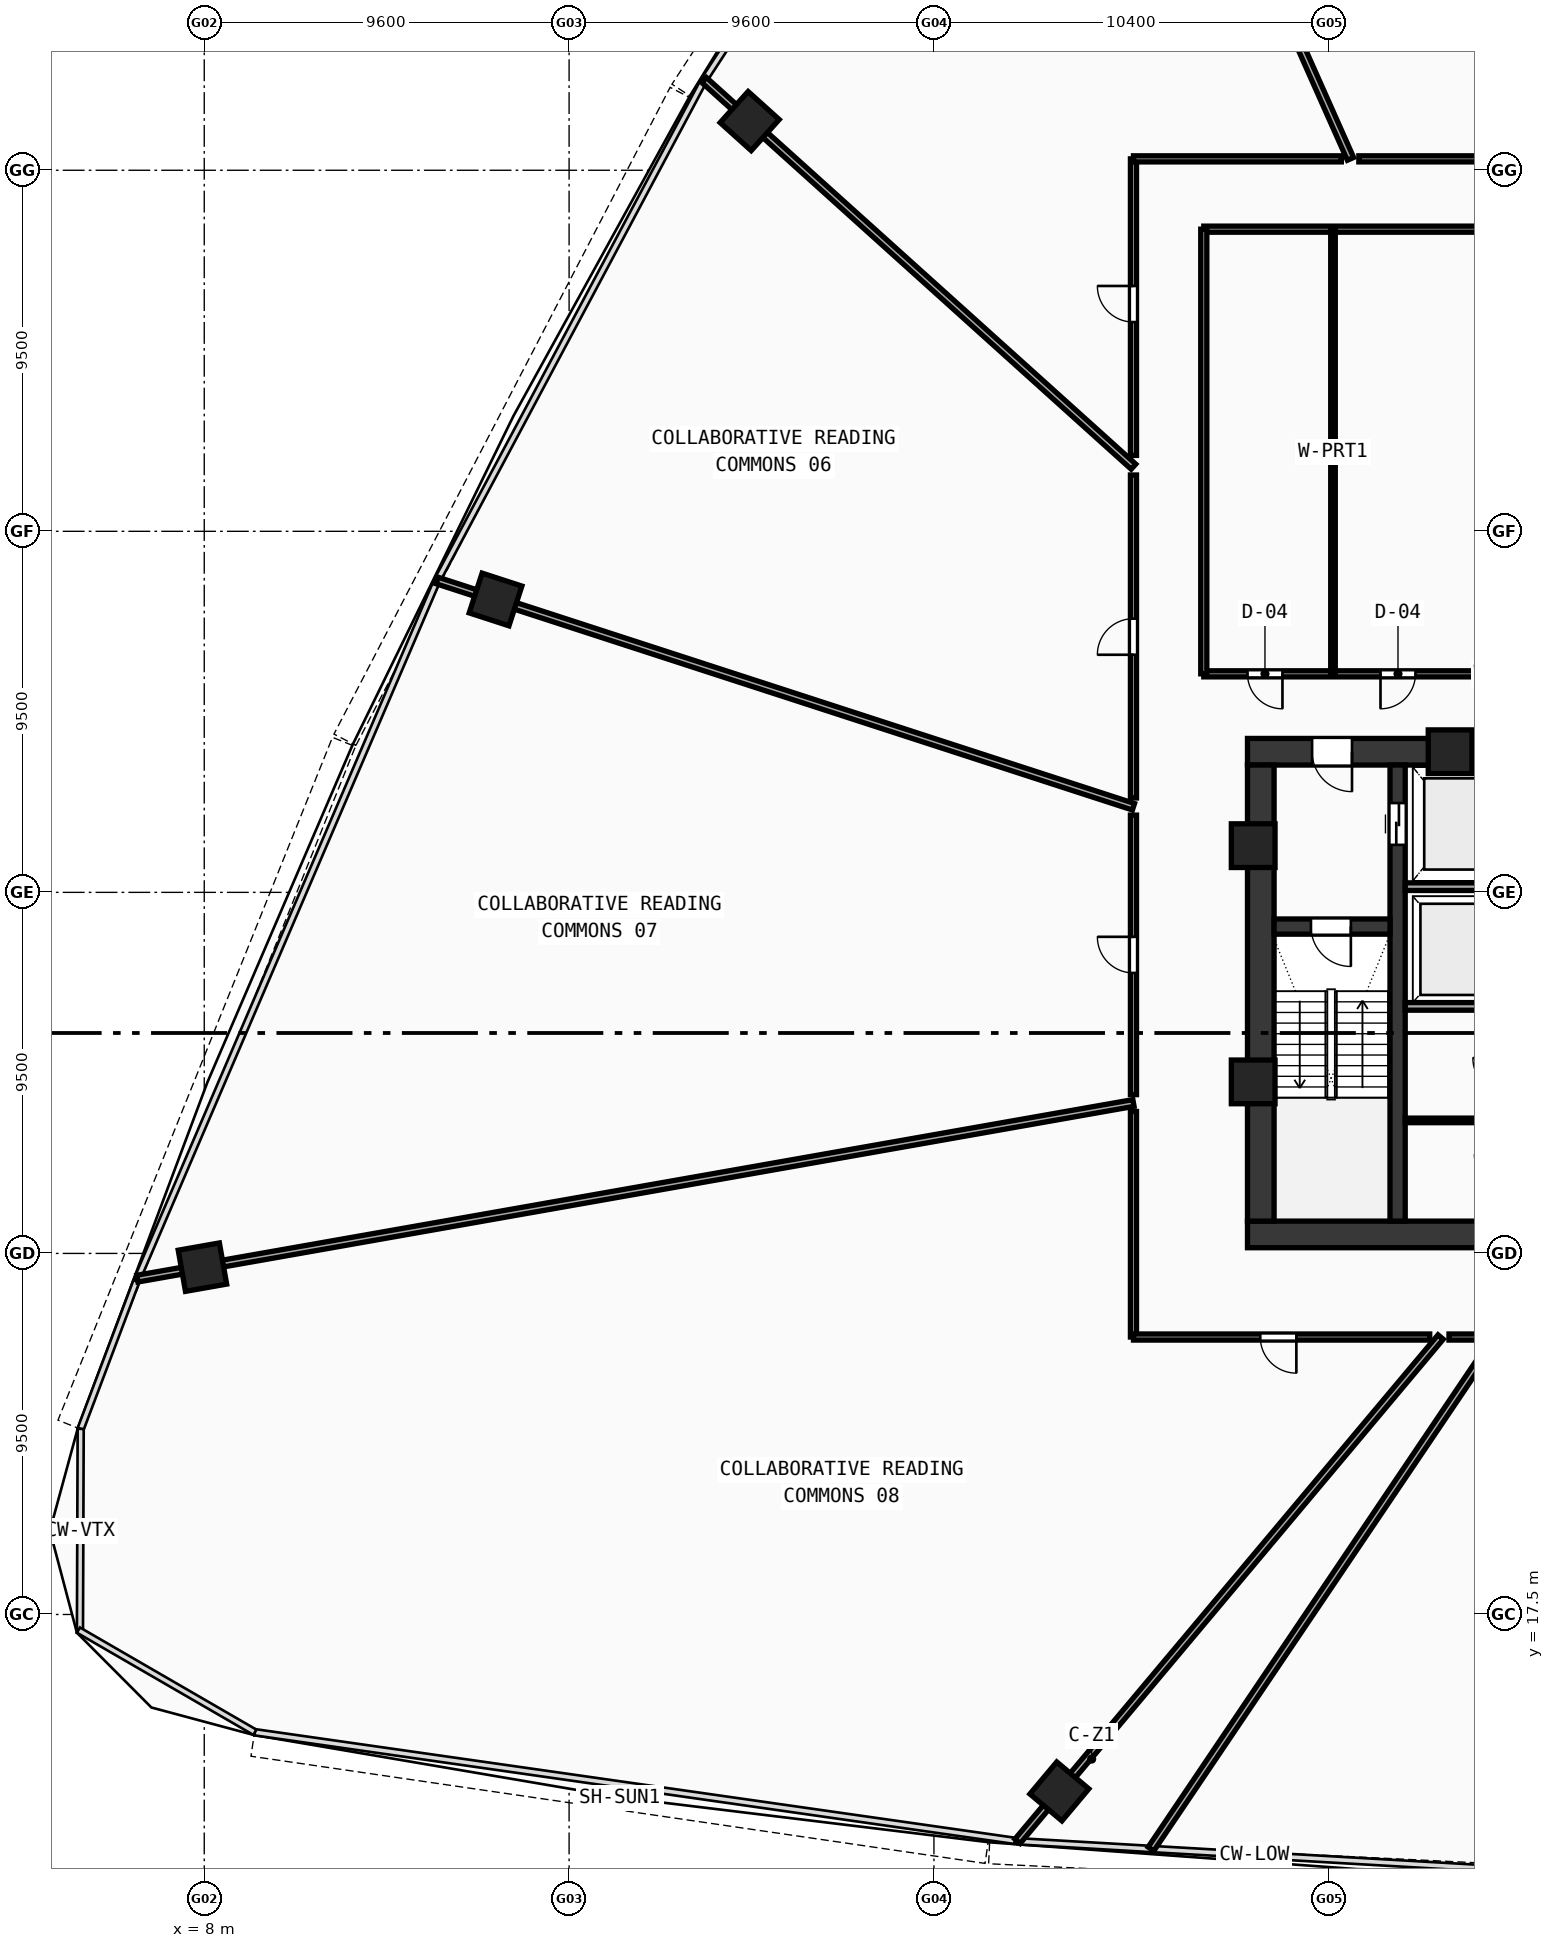
"""IFC4 building model, lengths in metres.
Left out: names, types, materials, properties, quantities, classifications, styles, units other than length and angle.
Written with IfcOpenShell. Run it as: python <this file> out.ifc"""

import sys

from ifc_helpers import new_model, si_unit, direction, frame, frame_2d, origin, origin_with_axes, origin_2d, place, context, subcontext, project, spatial, rectangle, hollow_rectangle, extrude, source, transform, mapped, element, fill, save


model = new_model("IFC4")
c1 = context("Model", 3, precision=1e-05, world=origin(), true_north=direction((0.0, 1.0)))
c2 = subcontext(c1, "Body", "Model", "MODEL_VIEW")
j1 = project(units=[si_unit("LENGTHUNIT", "METRE"), si_unit("PLANEANGLEUNIT", "RADIAN")], contexts=[c1])
p1 = place(None, origin())
s1 = spatial("IfcSite", under=j1, at=p1, CompositionType="ELEMENT")
p2 = place(p1, origin())
s2 = spatial("IfcBuilding", under=s1, at=p2, CompositionType="ELEMENT")
p3 = place(p2, frame((0.0, 0.0, 48.55)))
s3 = spatial("IfcBuildingStorey", under=s2, at=p3, CompositionType="ELEMENT", Elevation=48.55)
p4 = place(p3, frame((35.45, 27.5, 0.0), z_axis=(0.0, 0.0, 1.0), x_axis=(1.0, 0.0, 0.0)))
e1 = element("IfcWall", 1, at=p4, inside=s3, PredefinedType="SHEAR", context=c2, shape_type="SweptSolid", body=[
    extrude(rectangle(XDim=25.1, YDim=0.7, at=frame_2d((12.55, 0.0))), origin(), (0.0, 0.0, 1.0), 3.37),
])
p5 = place(p3, frame((35.45, 40.2, 0.0), z_axis=(0.0, 0.0, 1.0), x_axis=(1.0, 0.0, 0.0)))
e2 = element("IfcWall", 2, at=p5, inside=s3, PredefinedType="SHEAR", context=c2, shape_type="SweptSolid", body=[
    extrude(rectangle(XDim=11.35, YDim=0.7, at=frame_2d((5.675, 0.0))), origin(), (0.0, 0.0, 1.0), 3.37),
])
p6 = place(p5, frame((1.7, 0.0, 0.0)))
e3 = element("IfcOpeningElement", 3, at=p6, cuts=e2, PredefinedType="OPENING", context=c2, shape_type="SweptSolid", body=[
    extrude(rectangle(XDim=1.05, YDim=2.1, at=frame_2d((0.525, 1.05))), frame((0.0, 0.36, 0.0), z_axis=(0.0, -1.0, 0.0), x_axis=(1.0, 0.0, 0.0)), (0.0, 0.0, 1.0), 0.72),
])
p7 = place(p3, frame((35.8, 27.85, 0.0), z_axis=(0.0, 0.0, 1.0), x_axis=(0.0, 1.0, 0.0)))
e4 = element("IfcWall", 4, at=p7, inside=s3, PredefinedType="SHEAR", context=c2, shape_type="SweptSolid", body=[
    extrude(rectangle(XDim=12.0, YDim=0.7, at=frame_2d((6.0, 0.0))), origin(), (0.0, 0.0, 1.0), 3.37),
])
p8 = place(p3, frame((39.4, 27.85, 0.0), z_axis=(0.0, 0.0, 1.0), x_axis=(0.0, 1.0, 0.0)))
e5 = element("IfcWall", 5, at=p8, inside=s3, PredefinedType="SHEAR", context=c2, shape_type="SweptSolid", body=[
    extrude(rectangle(XDim=12.0, YDim=0.4, at=frame_2d((6.0, 0.0))), origin(), (0.0, 0.0, 1.0), 3.37),
])
p9 = place(p8, frame((9.9, 0.0, 0.0)))
e6 = element("IfcOpeningElement", 6, at=p9, cuts=e5, PredefinedType="OPENING", context=c2, shape_type="SweptSolid", body=[
    extrude(rectangle(XDim=1.1, YDim=2.1, at=frame_2d((0.55, 1.05))), frame((0.0, 0.21, 0.0), z_axis=(0.0, -1.0, 0.0), x_axis=(1.0, 0.0, 0.0)), (0.0, 0.0, 1.0), 0.42),
])
p10 = place(p3, frame((36.15, 35.6, 0.0), z_axis=(0.0, 0.0, 1.0), x_axis=(1.0, 0.0, 0.0)))
e7 = element("IfcWall", 7, at=p10, inside=s3, PredefinedType="SHEAR", context=c2, shape_type="SweptSolid", body=[
    extrude(rectangle(XDim=3.05, YDim=0.4, at=frame_2d((1.525, 0.0))), origin(), (0.0, 0.0, 1.0), 3.37),
])
p11 = place(p10, frame((0.97, 0.0, 0.0)))
e8 = element("IfcOpeningElement", 8, at=p11, cuts=e7, PredefinedType="OPENING", context=c2, shape_type="SweptSolid", body=[
    extrude(rectangle(XDim=1.05, YDim=2.1, at=frame_2d((0.525, 1.05))), frame((0.0, 0.21, 0.0), z_axis=(0.0, -1.0, 0.0), x_axis=(1.0, 0.0, 0.0)), (0.0, 0.0, 1.0), 0.42),
])
m1 = source(origin(), c2, "Body", "SweptSolid", [
    extrude(hollow_rectangle(XDim=1.15, YDim=1.15, WallThickness=0.048, at=origin_2d()), origin(), (0.0, 0.0, 1.0), 3.63),
])
for number, where, z_axis, x_axis in (
    (9, (40.781, 40.2, -0.26), (0.0, 0.0, 1.0), (1.0, 0.0, 0.0)),
    (10, (35.6, 37.729, -0.26), (0.0, 0.0, 1.0), (1.0, 0.0, 0.0)),
    (11, (35.6, 31.513, -0.26), (0.0, 0.0, 1.0), (1.0, 0.0, 0.0)),
):
    element("IfcColumn", number, at=place(p3, frame(where, z_axis=z_axis, x_axis=x_axis)), inside=s3, PredefinedType="COLUMN", context=c2, shape_type="MappedRepresentation", body=[
        mapped(m1, transform((0.0, 0.0, 0.0), scale=1.0)),
    ])
m2 = source(origin(), c2, "Body", "SweptSolid", [
    extrude(hollow_rectangle(XDim=1.1, YDim=1.1, WallThickness=0.045, at=origin_2d()), origin(), (0.0, 0.0, 1.0), 3.63),
])
for number, where, z_axis, x_axis in (
    (12, (30.5, 12.844, -0.26), (0.0, 0.0, 1.0), (0.766, -0.643, 0.0)),
    (13, (22.351, 56.794, -0.26), (0.0, 0.0, 1.0), (-0.669, -0.743, 0.0)),
    (14, (15.665, 44.206, -0.26), (0.0, 0.0, 1.0), (-0.309, -0.951, 0.0)),
    (15, (7.952, 26.638, -0.26), (0.0, 0.0, 1.0), (0.174, -0.985, 0.0)),
):
    element("IfcColumn", number, at=place(p3, frame(where, z_axis=z_axis, x_axis=x_axis)), inside=s3, PredefinedType="COLUMN", context=c2, shape_type="MappedRepresentation", body=[
        mapped(m2, transform((0.0, 0.0, 0.0), scale=1.0)),
    ])
for number, where, z_axis, x_axis in (
    (16, (39.6, 36.65, 0.0), (0.0, 0.0, 1.0), (1.0, 0.0, 0.0)),
    (17, (39.6, 33.5, 0.0), (0.0, 0.0, 1.0), (1.0, 0.0, 0.0)),
):
    element("IfcWall", number, at=place(p3, frame(where, z_axis=z_axis, x_axis=x_axis)), inside=s3, PredefinedType="SOLIDWALL", context=c2, shape_type="SweptSolid", body=[
        extrude(rectangle(XDim=2.72, YDim=0.2, at=frame_2d((1.36, 0.0))), origin(), (0.0, 0.0, 1.0), 3.37),
    ])
p12 = place(p3, frame((39.6, 30.5, 0.0), z_axis=(0.0, 0.0, 1.0), x_axis=(1.0, 0.0, 0.0)))
e18 = element("IfcWall", 18, at=p12, inside=s3, PredefinedType="PARTITIONING", context=c2, shape_type="SweptSolid", body=[
    extrude(rectangle(XDim=2.72, YDim=0.12, at=frame_2d((1.36, 0.0))), origin(), (0.0, 0.0, 1.0), 3.37),
])
p13 = place(p3, frame((34.3, 42.25, 0.0), z_axis=(0.0, 0.0, 1.0), x_axis=(1.0, 0.0, 0.0)))
e19 = element("IfcWall", 19, at=p13, inside=s3, PredefinedType="PARTITIONING", context=c2, shape_type="SweptSolid", body=[
    extrude(rectangle(XDim=9.58, YDim=0.16, at=frame_2d((4.79, 0.0))), origin(), (0.0, 0.0, 1.0), 2.67),
])
p14 = place(p13, frame((1.15, 0.0, 0.0)))
e20 = element("IfcOpeningElement", 20, at=p14, cuts=e19, PredefinedType="OPENING", context=c2, shape_type="SweptSolid", body=[
    extrude(rectangle(XDim=0.92, YDim=2.1, at=frame_2d((0.46, 1.05))), frame((0.0, 0.09, 0.0), z_axis=(0.0, -1.0, 0.0), x_axis=(1.0, 0.0, 0.0)), (0.0, 0.0, 1.0), 0.18),
])
p15 = place(p13, frame((4.65, 0.0, 0.0)))
e21 = element("IfcOpeningElement", 21, at=p15, cuts=e19, PredefinedType="OPENING", context=c2, shape_type="SweptSolid", body=[
    extrude(rectangle(XDim=0.92, YDim=2.1, at=frame_2d((0.46, 1.05))), frame((0.0, 0.09, 0.0), z_axis=(0.0, -1.0, 0.0), x_axis=(1.0, 0.0, 0.0)), (0.0, 0.0, 1.0), 0.18),
])
p16 = place(p3, frame((34.3, 53.95, 0.0), z_axis=(0.0, 0.0, 1.0), x_axis=(1.0, 0.0, 0.0)))
e22 = element("IfcWall", 22, at=p16, inside=s3, PredefinedType="PARTITIONING", context=c2, shape_type="SweptSolid", body=[
    extrude(rectangle(XDim=9.58, YDim=0.16, at=frame_2d((4.79, 0.0))), origin(), (0.0, 0.0, 1.0), 2.67),
])
p17 = place(p3, frame((34.3, 42.25, 0.0), z_axis=(0.0, 0.0, 1.0), x_axis=(0.0, 1.0, 0.0)))
e23 = element("IfcWall", 23, at=p17, inside=s3, PredefinedType="PARTITIONING", context=c2, shape_type="SweptSolid", body=[
    extrude(rectangle(XDim=11.7, YDim=0.16, at=frame_2d((5.85, 0.0))), origin(), (0.0, 0.0, 1.0), 2.67),
])
p18 = place(p3, frame((37.7, 42.25, 0.0), z_axis=(0.0, 0.0, 1.0), x_axis=(0.0, 1.0, 0.0)))
e24 = element("IfcWall", 24, at=p18, inside=s3, PredefinedType="PARTITIONING", context=c2, shape_type="SweptSolid", body=[
    extrude(rectangle(XDim=11.7, YDim=0.12, at=frame_2d((5.85, 0.0))), origin(), (0.0, 0.0, 1.0), 2.67),
])
p19 = place(p3, frame((38.16, 55.8, 0.0), z_axis=(0.0, 0.0, 1.0), x_axis=(-0.406730734994, 0.913548088067, 0.0)))
e25 = element("IfcWall", 25, at=p19, inside=s3, PredefinedType="PARTITIONING", context=c2, shape_type="SweptSolid", body=[
    extrude(rectangle(XDim=18.356, YDim=0.18, at=frame_2d((9.178, 0.0))), origin(), (0.0, 0.0, 1.0), 2.67),
])
p20 = place(p3, frame((32.45, 47.701, 0.0), z_axis=(0.0, 0.0, 1.0), x_axis=(-0.743155181141, 0.66911910505, 0.0)))
e26 = element("IfcWall", 26, at=p20, inside=s3, PredefinedType="PARTITIONING", context=c2, shape_type="SweptSolid", body=[
    extrude(rectangle(XDim=15.202, YDim=0.18, at=frame_2d((7.601, 0.0))), origin(), (0.0, 0.0, 1.0), 2.67),
])
p21 = place(p3, frame((32.45, 38.752, 0.0), z_axis=(0.0, 0.0, 1.0), x_axis=(-0.951055021268, 0.309021595557, 0.0)))
e27 = element("IfcWall", 27, at=p21, inside=s3, PredefinedType="PARTITIONING", context=c2, shape_type="SweptSolid", body=[
    extrude(rectangle(XDim=19.264, YDim=0.18, at=frame_2d((9.632, 0.0))), origin(), (0.0, 0.0, 1.0), 2.67),
])
p22 = place(p3, frame((32.45, 30.958, 0.0), z_axis=(0.0, 0.0, 1.0), x_axis=(-0.984808390998, -0.173644559431, 0.0)))
e28 = element("IfcWall", 28, at=p22, inside=s3, PredefinedType="PARTITIONING", context=c2, shape_type="SweptSolid", body=[
    extrude(rectangle(XDim=26.614, YDim=0.18, at=frame_2d((13.307, 0.0))), origin(), (0.0, 0.0, 1.0), 2.67),
])
p23 = place(p3, frame((40.532, 24.8, 0.0), z_axis=(0.0, 0.0, 1.0), x_axis=(-0.642784696521, -0.766046887546, 0.0)))
e29 = element("IfcWall", 29, at=p23, inside=s3, PredefinedType="PARTITIONING", context=c2, shape_type="SweptSolid", body=[
    extrude(rectangle(XDim=17.319, YDim=0.18, at=frame_2d((8.659, 0.0))), origin(), (0.0, 0.0, 1.0), 2.67),
])
p24 = place(p3, frame((41.997, 24.8, 0.0), z_axis=(0.0, 0.0, 1.0), x_axis=(-0.559182499599, -0.82904458996, 0.0)))
e30 = element("IfcWall", 30, at=p24, inside=s3, PredefinedType="PARTITIONING", context=c2, shape_type="SweptSolid", body=[
    extrude(rectangle(XDim=16.248, YDim=0.18, at=frame_2d((8.124, 0.0))), origin(), (0.0, 0.0, 1.0), 2.67),
])
p25 = place(p3, frame((32.45, 24.8, 0.0), z_axis=(0.0, 0.0, 1.0), x_axis=(0.0, 1.0, 0.0)))
e31 = element("IfcWall", 31, at=p25, inside=s3, PredefinedType="PARTITIONING", context=c2, shape_type="SweptSolid", body=[
    extrude(rectangle(XDim=5.935, YDim=0.16, at=frame_2d((2.967, 0.0))), origin(), (0.0, 0.0, 1.0), 2.97),
])
p26 = place(p3, frame((32.45, 31.178, 0.0), z_axis=(0.0, 0.0, 1.0), x_axis=(0.0, 1.0, 0.0)))
e32 = element("IfcWall", 32, at=p26, inside=s3, PredefinedType="PARTITIONING", context=c2, shape_type="SweptSolid", body=[
    extrude(rectangle(XDim=7.355, YDim=0.16, at=frame_2d((3.677, 0.0))), origin(), (0.0, 0.0, 1.0), 3.37),
])
p27 = place(p26, frame((3.202, 0.0, 0.0)))
e33 = element("IfcOpeningElement", 33, at=p27, cuts=e32, PredefinedType="OPENING", context=c2, shape_type="SweptSolid", body=[
    extrude(rectangle(XDim=0.95, YDim=2.1, at=frame_2d((0.475, 1.05))), frame((0.0, 0.09, 0.0), z_axis=(0.0, -1.0, 0.0), x_axis=(1.0, 0.0, 0.0)), (0.0, 0.0, 1.0), 0.18),
])
p28 = place(p3, frame((32.45, 38.984, 0.0), z_axis=(0.0, 0.0, 1.0), x_axis=(0.0, 1.0, 0.0)))
e34 = element("IfcWall", 34, at=p28, inside=s3, PredefinedType="PARTITIONING", context=c2, shape_type="SweptSolid", body=[
    extrude(rectangle(XDim=8.498, YDim=0.16, at=frame_2d((4.249, 0.0))), origin(), (0.0, 0.0, 1.0), 2.67),
])
p29 = place(p28, frame((3.768, 0.0, 0.0)))
e35 = element("IfcOpeningElement", 35, at=p29, cuts=e34, PredefinedType="OPENING", context=c2, shape_type="SweptSolid", body=[
    extrude(rectangle(XDim=0.95, YDim=2.1, at=frame_2d((0.475, 1.05))), frame((0.0, 0.09, 0.0), z_axis=(0.0, -1.0, 0.0), x_axis=(1.0, 0.0, 0.0)), (0.0, 0.0, 1.0), 0.18),
])
p30 = place(p3, frame((32.45, 47.997, 0.0), z_axis=(0.0, 0.0, 1.0), x_axis=(0.0, 1.0, 0.0)))
e36 = element("IfcWall", 36, at=p30, inside=s3, PredefinedType="PARTITIONING", context=c2, shape_type="SweptSolid", body=[
    extrude(rectangle(XDim=7.803, YDim=0.16, at=frame_2d((3.901, 0.0))), origin(), (0.0, 0.0, 1.0), 3.37),
])
p31 = place(p30, frame((3.508, 0.0, 0.0)))
e37 = element("IfcOpeningElement", 37, at=p31, cuts=e36, PredefinedType="OPENING", context=c2, shape_type="SweptSolid", body=[
    extrude(rectangle(XDim=0.95, YDim=2.1, at=frame_2d((0.475, 1.05))), frame((0.0, 0.09, 0.0), z_axis=(0.0, -1.0, 0.0), x_axis=(1.0, 0.0, 0.0)), (0.0, 0.0, 1.0), 0.18),
])
p32 = place(p3, frame((32.45, 55.8, 0.0), z_axis=(0.0, 0.0, 1.0), x_axis=(1.0, 0.0, 0.0)))
e38 = element("IfcWall", 38, at=p32, inside=s3, PredefinedType="PARTITIONING", context=c2, shape_type="SweptSolid", body=[
    extrude(rectangle(XDim=5.47, YDim=0.16, at=frame_2d((2.735, 0.0))), origin(), (0.0, 0.0, 1.0), 3.37),
])
p33 = place(p3, frame((38.38, 55.8, 0.0), z_axis=(0.0, 0.0, 1.0), x_axis=(1.0, 0.0, 0.0)))
e39 = element("IfcWall", 39, at=p33, inside=s3, PredefinedType="PARTITIONING", context=c2, shape_type="SweptSolid", body=[
    extrude(rectangle(XDim=5.329, YDim=0.16, at=frame_2d((2.665, 0.0))), origin(), (0.0, 0.0, 1.0), 2.67),
])
p34 = place(p3, frame((41.731, 24.8, 0.0), z_axis=(0.0, 0.0, 1.0), x_axis=(-1.0, 0.0, 0.0)))
e40 = element("IfcWall", 40, at=p34, inside=s3, PredefinedType="PARTITIONING", context=c2, shape_type="SweptSolid", body=[
    extrude(rectangle(XDim=0.979, YDim=0.16, at=frame_2d((0.49, 0.0))), origin(), (0.0, 0.0, 1.0), 2.67),
])
p35 = place(p3, frame((40.245, 24.8, 0.0), z_axis=(0.0, 0.0, 1.0), x_axis=(-1.0, 0.0, 0.0)))
e41 = element("IfcWall", 41, at=p35, inside=s3, PredefinedType="PARTITIONING", context=c2, shape_type="SweptSolid", body=[
    extrude(rectangle(XDim=7.795, YDim=0.16, at=frame_2d((3.897, 0.0))), origin(), (0.0, 0.0, 1.0), 2.97),
])
p36 = place(p35, frame((3.509, 0.0, 0.0)))
e42 = element("IfcOpeningElement", 42, at=p36, cuts=e41, PredefinedType="OPENING", context=c2, shape_type="SweptSolid", body=[
    extrude(rectangle(XDim=0.95, YDim=2.1, at=frame_2d((0.475, 1.05))), frame((0.0, 0.09, 0.0), z_axis=(0.0, -1.0, 0.0), x_axis=(1.0, 0.0, 0.0)), (0.0, 0.0, 1.0), 0.18),
])
m3 = source(origin(), c2, "Body", "SweptSolid", [
    extrude(rectangle(XDim=1.05, YDim=2.1, at=frame_2d((0.525, 1.05))), frame((0.0, 0.025, 0.0), z_axis=(0.0, -1.0, 0.0), x_axis=(1.0, 0.0, 0.0)), (0.0, 0.0, 1.0), 0.05),
])
p37 = place(p11, frame((1.05, 0.0, 0.0), z_axis=(0.0, 0.0, 1.0), x_axis=(-1.0, 0.0, 0.0)))
e43 = element("IfcDoor", 43, at=p37, inside=s3, OperationType="SINGLE_SWING_LEFT", PredefinedType="DOOR", context=c2, shape_type="MappedRepresentation", body=[
    mapped(m3, transform((0.0, 0.0, 0.0), scale=1.0)),
])
fill(e8, e43)
p38 = place(p6, frame((1.05, 0.0, 0.0), z_axis=(0.0, 0.0, 1.0), x_axis=(-1.0, 0.0, 0.0)))
e44 = element("IfcDoor", 44, at=p38, inside=s3, OperationType="SINGLE_SWING_LEFT", PredefinedType="DOOR", context=c2, shape_type="MappedRepresentation", body=[
    mapped(m3, transform((0.0, 0.0, 0.0), scale=1.0)),
])
fill(e3, e44)
m4 = source(origin(), c2, "Body", "SweptSolid", [
    extrude(rectangle(XDim=1.1, YDim=2.1, at=frame_2d((0.55, 1.05))), frame((0.0, 0.025, 0.0), z_axis=(0.0, -1.0, 0.0), x_axis=(1.0, 0.0, 0.0)), (0.0, 0.0, 1.0), 0.05),
])
p39 = place(p9, frame((1.1, 0.0, 0.0), z_axis=(0.0, 0.0, 1.0), x_axis=(-1.0, 0.0, 0.0)))
e45 = element("IfcDoor", 45, at=p39, inside=s3, OperationType="DOUBLE_DOOR_SLIDING", PredefinedType="DOOR", context=c2, shape_type="MappedRepresentation", body=[
    mapped(m4, transform((0.0, 0.0, 0.0), scale=1.0)),
])
fill(e6, e45)
m5 = source(origin(), c2, "Body", "SweptSolid", [
    extrude(rectangle(XDim=0.92, YDim=2.1, at=frame_2d((0.46, 1.05))), frame((0.0, 0.025, 0.0), z_axis=(0.0, -1.0, 0.0), x_axis=(1.0, 0.0, 0.0)), (0.0, 0.0, 1.0), 0.05),
])
p40 = place(p14, frame((0.92, 0.0, 0.0), z_axis=(0.0, 0.0, 1.0), x_axis=(-1.0, 0.0, 0.0)))
e46 = element("IfcDoor", 46, at=p40, inside=s3, OperationType="SINGLE_SWING_LEFT", PredefinedType="DOOR", context=c2, shape_type="MappedRepresentation", body=[
    mapped(m5, transform((0.0, 0.0, 0.0), scale=1.0)),
])
fill(e20, e46)
p41 = place(p15, frame((0.92, 0.0, 0.0), z_axis=(0.0, 0.0, 1.0), x_axis=(-1.0, 0.0, 0.0)))
e47 = element("IfcDoor", 47, at=p41, inside=s3, OperationType="SINGLE_SWING_RIGHT", PredefinedType="DOOR", context=c2, shape_type="MappedRepresentation", body=[
    mapped(m5, transform((0.0, 0.0, 0.0), scale=1.0)),
])
fill(e21, e47)
m6 = source(origin(), c2, "Body", "SweptSolid", [
    extrude(rectangle(XDim=0.95, YDim=2.1, at=frame_2d((0.475, 1.05))), frame((0.0, 0.025, 0.0), z_axis=(0.0, -1.0, 0.0), x_axis=(1.0, 0.0, 0.0)), (0.0, 0.0, 1.0), 0.05),
])
p42 = place(p31, origin_with_axes())
e48 = element("IfcDoor", 48, at=p42, inside=s3, OperationType="SINGLE_SWING_RIGHT", PredefinedType="DOOR", context=c2, shape_type="MappedRepresentation", body=[
    mapped(m6, transform((0.0, 0.0, 0.0), scale=1.0)),
])
fill(e37, e48)
p43 = place(p29, origin_with_axes())
e49 = element("IfcDoor", 49, at=p43, inside=s3, OperationType="SINGLE_SWING_LEFT", PredefinedType="DOOR", context=c2, shape_type="MappedRepresentation", body=[
    mapped(m6, transform((0.0, 0.0, 0.0), scale=1.0)),
])
fill(e35, e49)
p44 = place(p27, origin_with_axes())
e50 = element("IfcDoor", 50, at=p44, inside=s3, OperationType="SINGLE_SWING_RIGHT", PredefinedType="DOOR", context=c2, shape_type="MappedRepresentation", body=[
    mapped(m6, transform((0.0, 0.0, 0.0), scale=1.0)),
])
fill(e33, e50)
p45 = place(p36, origin_with_axes())
e51 = element("IfcDoor", 51, at=p45, inside=s3, OperationType="SINGLE_SWING_LEFT", PredefinedType="DOOR", context=c2, shape_type="MappedRepresentation", body=[
    mapped(m6, transform((0.0, 0.0, 0.0), scale=1.0)),
])
fill(e42, e51)
save(model, sys.argv[1])
